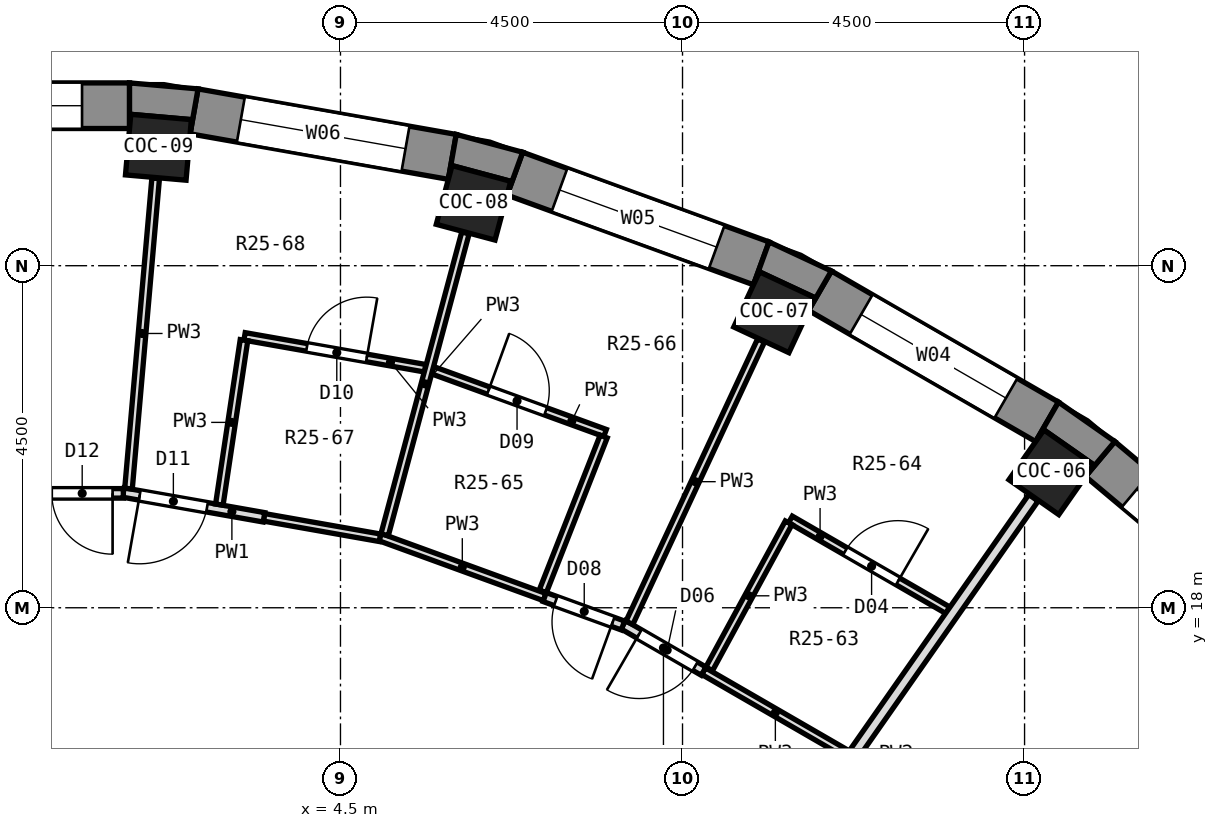
"""IFC4 building model, lengths in metres.
Left out: names, types, materials, properties, quantities, classifications, styles, units other than length and angle.
Written with IfcOpenShell. Run it as: python <this file> out.ifc"""

import sys

from ifc_helpers import new_model, si_unit, direction, frame, frame_2d, origin, origin_2d, place, context, subcontext, project, spatial, polyline, rectangle, outline, extrude, element, fill, save


model = new_model("IFC4")
c1 = context("Model", 3, precision=1e-05, world=origin(), true_north=direction((0.0, 1.0)))
c2 = subcontext(c1, "Body", "Model", "MODEL_VIEW")
j1 = project(units=[si_unit("LENGTHUNIT", "METRE"), si_unit("PLANEANGLEUNIT", "RADIAN")], contexts=[c1])
p1 = place(None, origin())
s1 = spatial("IfcSite", under=j1, at=p1, CompositionType="ELEMENT")
p2 = place(p1, origin())
s2 = spatial("IfcBuilding", under=s1, at=p2, CompositionType="ELEMENT")
p3 = place(p2, frame((0.0, 0.0, 160.8)))
s3 = spatial("IfcBuildingStorey", under=s2, at=p3, CompositionType="ELEMENT", Elevation=160.8)
for number, where, z_axis, x_axis in (
    (1, (13.852, 19.782, 0.0), (0.0, 0.0, 1.0), (0.574, 0.819, 0.0)),
    (2, (10.206, 21.887, 0.0), (0.0, 0.0, 1.0), (0.423, 0.906, 0.0)),
    (3, (6.25, 23.327, 0.0), (0.0, 0.0, 1.0), (0.259, 0.966, 0.0)),
    (4, (2.105, 24.058, 0.0), (0.0, 0.0, 1.0), (0.087, 0.996, 0.0)),
):
    element("IfcColumn", number, at=place(p3, frame(where, z_axis=z_axis, x_axis=x_axis)), inside=s3, PredefinedType="COLUMN", context=c2, shape_type="SweptSolid", body=[
        extrude(rectangle(XDim=0.8, YDim=0.8, at=origin_2d()), origin(), (0.0, 0.0, 1.0), 3.3),
    ])
p4 = place(p3, frame((17.137, 17.74, 0.0), z_axis=(0.0, 0.0, 1.0), x_axis=(-0.766058884809, 0.642770398358, 0.0)))
e5 = element("IfcWall", 5, at=p4, inside=s3, PredefinedType="SOLIDWALL", context=c2, shape_type="SweptSolid", body=[
    extrude(rectangle(XDim=3.449, YDim=0.6, at=frame_2d((1.725, 0.0))), origin(), (0.0, 0.0, 1.0), 2.85),
])
p5 = place(p4, frame((0.625, 0.0, 0.9)))
e6 = element("IfcOpeningElement", 6, at=p5, cuts=e5, PredefinedType="OPENING", context=c2, shape_type="SweptSolid", body=[
    extrude(rectangle(XDim=2.2, YDim=1.8, at=frame_2d((1.1, 0.9))), frame((0.0, 0.312, 0.0), z_axis=(0.0, -1.0, 0.0), x_axis=(1.0, 0.0, 0.0)), (0.0, 0.0, 1.0), 0.624),
])
p6 = place(p3, frame((13.796, 20.446, 0.0), z_axis=(0.0, 0.0, 1.0), x_axis=(-0.86602648383, 0.499998129301, 0.0)))
e7 = element("IfcWall", 7, at=p6, inside=s3, PredefinedType="SOLIDWALL", context=c2, shape_type="SweptSolid", body=[
    extrude(rectangle(XDim=3.45, YDim=0.6, at=frame_2d((1.725, 0.0))), origin(), (0.0, 0.0, 1.0), 2.85),
])
p7 = place(p6, frame((0.625, 0.0, 0.9)))
e8 = element("IfcOpeningElement", 8, at=p7, cuts=e7, PredefinedType="OPENING", context=c2, shape_type="SweptSolid", body=[
    extrude(rectangle(XDim=2.2, YDim=1.8, at=frame_2d((1.1, 0.9))), frame((0.0, 0.312, 0.0), z_axis=(0.0, -1.0, 0.0), x_axis=(1.0, 0.0, 0.0)), (0.0, 0.0, 1.0), 0.624),
])
p8 = place(p3, frame((10.036, 22.531, 0.0), z_axis=(0.0, 0.0, 1.0), x_axis=(-0.93968799822, 0.342032843455, 0.0)))
e9 = element("IfcWall", 9, at=p8, inside=s3, PredefinedType="SOLIDWALL", context=c2, shape_type="SweptSolid", body=[
    extrude(rectangle(XDim=3.45, YDim=0.6, at=frame_2d((1.725, 0.0))), origin(), (0.0, 0.0, 1.0), 2.85),
])
p9 = place(p8, frame((0.625, 0.0, 0.9)))
e10 = element("IfcOpeningElement", 10, at=p9, cuts=e9, PredefinedType="OPENING", context=c2, shape_type="SweptSolid", body=[
    extrude(rectangle(XDim=2.2, YDim=1.8, at=frame_2d((1.1, 0.9))), frame((0.0, 0.312, 0.0), z_axis=(0.0, -1.0, 0.0), x_axis=(1.0, 0.0, 0.0)), (0.0, 0.0, 1.0), 0.624),
])
p10 = place(p3, frame((5.971, 23.932, 0.0), z_axis=(0.0, 0.0, 1.0), x_axis=(-0.984814892183, 0.173607684551, 0.0)))
e11 = element("IfcWall", 11, at=p10, inside=s3, PredefinedType="SOLIDWALL", context=c2, shape_type="SweptSolid", body=[
    extrude(rectangle(XDim=3.45, YDim=0.6, at=frame_2d((1.725, 0.0))), origin(), (0.0, 0.0, 1.0), 2.85),
])
p11 = place(p10, frame((0.625, 0.0, 0.9)))
e12 = element("IfcOpeningElement", 12, at=p11, cuts=e11, PredefinedType="OPENING", context=c2, shape_type="SweptSolid", body=[
    extrude(rectangle(XDim=2.2, YDim=1.8, at=frame_2d((1.1, 0.9))), frame((0.0, 0.312, 0.0), z_axis=(0.0, -1.0, 0.0), x_axis=(1.0, 0.0, 0.0)), (0.0, 0.0, 1.0), 0.624),
])
p12 = place(p3, frame((1.725, 24.605, 0.0), z_axis=(0.0, 0.0, 1.0), x_axis=(-1.0, 0.0, 0.0)))
e13 = element("IfcWall", 13, at=p12, inside=s3, PredefinedType="SOLIDWALL", context=c2, shape_type="SweptSolid", body=[
    extrude(rectangle(XDim=3.45, YDim=0.6, at=frame_2d((1.725, 0.0))), origin(), (0.0, 0.0, 1.0), 2.85),
])
p13 = place(p12, frame((0.625, 0.0, 0.9)))
e14 = element("IfcOpeningElement", 14, at=p13, cuts=e13, PredefinedType="OPENING", context=c2, shape_type="SweptSolid", body=[
    extrude(rectangle(XDim=2.2, YDim=1.8, at=frame_2d((1.1, 0.9))), frame((0.0, 0.312, 0.0), z_axis=(0.0, -1.0, 0.0), x_axis=(1.0, 0.0, 0.0)), (0.0, 0.0, 1.0), 0.624),
])
p14 = place(p3, origin())
e15 = element("IfcWall", 15, at=p14, inside=s3, PredefinedType="SOLIDWALL", context=c2, shape_type="SweptSolid", body=[
    extrude(outline(polyline([(14.687, 20.187), (13.946, 20.706), (13.646, 20.186), (13.754, 20.34), (14.409, 19.881), (14.302, 19.727), (14.687, 20.187)])), origin(), (0.0, 0.0, 1.0), 2.85),
])
p15 = place(p3, origin())
e16 = element("IfcWall", 16, at=p15, inside=s3, PredefinedType="SOLIDWALL", context=c2, shape_type="SweptSolid", body=[
    extrude(outline(polyline([(10.139, 22.813), (9.934, 22.249), (10.013, 22.419), (10.738, 22.081), (10.659, 21.911), (10.959, 22.431), (10.139, 22.813)])), origin(), (0.0, 0.0, 1.0), 2.85),
])
p16 = place(p3, origin())
e17 = element("IfcWall", 17, at=p16, inside=s3, PredefinedType="SOLIDWALL", context=c2, shape_type="SweptSolid", body=[
    extrude(outline(polyline([(6.023, 24.227), (5.919, 23.636), (5.968, 23.817), (6.74, 23.61), (6.692, 23.429), (6.897, 23.993), (6.023, 24.227)])), origin(), (0.0, 0.0, 1.0), 2.85),
])
p17 = place(p3, origin())
e18 = element("IfcWall", 18, at=p17, inside=s3, PredefinedType="SOLIDWALL", context=c2, shape_type="SweptSolid", body=[
    extrude(outline(polyline([(2.626, 24.826), (1.725, 24.905), (1.725, 24.305), (1.741, 24.491), (2.538, 24.422), (2.522, 24.235), (2.626, 24.826)])), origin(), (0.0, 0.0, 1.0), 2.85),
])
p18 = place(p3, frame((9.278, 17.166, 0.0), z_axis=(0.0, 0.0, 1.0), x_axis=(0.865855370195, -0.500294391238, 0.0)))
e19 = element("IfcWall", 19, at=p18, inside=s3, PredefinedType="PARTITIONING", context=c2, shape_type="SweptSolid", body=[
    extrude(rectangle(XDim=2.18, YDim=0.1, at=frame_2d((1.09, 0.0))), origin(), (0.0, 0.0, 1.0), 2.85),
])
p19 = place(p3, frame((8.22, 17.777, 0.0), z_axis=(0.0, 0.0, 1.0), x_axis=(0.865945878506, -0.500137716533, 0.0)))
e20 = element("IfcWall", 20, at=p19, inside=s3, PredefinedType="PARTITIONING", context=c2, shape_type="SweptSolid", body=[
    extrude(rectangle(XDim=1.221, YDim=0.125, at=frame_2d((0.611, 0.0))), origin(), (0.0, 0.0, 1.0), 2.85),
])
p20 = place(p19, frame((0.242, 0.0, 0.0)))
e21 = element("IfcOpeningElement", 21, at=p20, cuts=e20, PredefinedType="OPENING", context=c2, shape_type="SweptSolid", body=[
    extrude(rectangle(XDim=0.85, YDim=2.1, at=frame_2d((0.425, 1.05))), frame((0.0, 0.074, 0.0), z_axis=(0.0, -1.0, 0.0), x_axis=(1.0, 0.0, 0.0)), (0.0, 0.0, 1.0), 0.149),
])
p21 = place(p3, frame((10.42, 19.162, 0.0), z_axis=(0.0, 0.0, 1.0), x_axis=(0.866129460467, -0.499819725211, 0.0)))
e22 = element("IfcWall", 22, at=p21, inside=s3, PredefinedType="PARTITIONING", context=c2, shape_type="SweptSolid", body=[
    extrude(rectangle(XDim=2.39, YDim=0.1, at=frame_2d((1.195, 0.0))), origin(), (0.0, 0.0, 1.0), 2.85),
])
p22 = place(p21, frame((0.833, 0.0, 0.0)))
e23 = element("IfcOpeningElement", 23, at=p22, cuts=e22, PredefinedType="OPENING", context=c2, shape_type="SweptSolid", body=[
    extrude(rectangle(XDim=0.8, YDim=2.1, at=frame_2d((0.4, 1.05))), frame((0.0, 0.062, 0.0), z_axis=(0.0, -1.0, 0.0), x_axis=(1.0, 0.0, 0.0)), (0.0, 0.0, 1.0), 0.124),
])
p23 = place(p3, frame((5.02, 18.929, 0.0), z_axis=(0.0, 0.0, 1.0), x_axis=(0.939651079277, -0.342134256123, 0.0)))
e24 = element("IfcWall", 24, at=p23, inside=s3, PredefinedType="PARTITIONING", context=c2, shape_type="SweptSolid", body=[
    extrude(rectangle(XDim=2.305, YDim=0.1, at=frame_2d((1.152, 0.0))), origin(), (0.0, 0.0, 1.0), 2.85),
])
p24 = place(p3, frame((7.186, 18.141, 0.0), z_axis=(0.0, 0.0, 1.0), x_axis=(0.939832432098, -0.341635770341, 0.0)))
e25 = element("IfcWall", 25, at=p24, inside=s3, PredefinedType="PARTITIONING", context=c2, shape_type="SweptSolid", body=[
    extrude(rectangle(XDim=1.096, YDim=0.125, at=frame_2d((0.548, 0.0))), origin(), (0.0, 0.0, 1.0), 2.85),
])
p25 = place(p24, frame((0.154, 0.0, 0.0)))
e26 = element("IfcOpeningElement", 26, at=p25, cuts=e25, PredefinedType="OPENING", context=c2, shape_type="SweptSolid", body=[
    extrude(rectangle(XDim=0.8, YDim=2.1, at=frame_2d((0.4, 1.05))), frame((0.0, 0.074, 0.0), z_axis=(0.0, -1.0, 0.0), x_axis=(1.0, 0.0, 0.0)), (0.0, 0.0, 1.0), 0.149),
])
p26 = place(p3, frame((5.712, 21.125, 0.0), z_axis=(0.0, 0.0, 1.0), x_axis=(0.939684150909, -0.342043413226, 0.0)))
e27 = element("IfcWall", 27, at=p26, inside=s3, PredefinedType="PARTITIONING", context=c2, shape_type="SweptSolid", body=[
    extrude(rectangle(XDim=2.415, YDim=0.1, at=frame_2d((1.208, 0.0))), origin(), (0.0, 0.0, 1.0), 2.85),
])
p27 = place(p26, frame((0.782, 0.0, 0.0)))
e28 = element("IfcOpeningElement", 28, at=p27, cuts=e27, PredefinedType="OPENING", context=c2, shape_type="SweptSolid", body=[
    extrude(rectangle(XDim=0.8, YDim=2.1, at=frame_2d((0.4, 1.05))), frame((0.0, 0.062, 0.0), z_axis=(0.0, -1.0, 0.0), x_axis=(1.0, 0.0, 0.0)), (0.0, 0.0, 1.0), 0.124),
])
p28 = place(p3, frame((3.494, 19.19, 0.0), z_axis=(0.0, 0.0, 1.0), x_axis=(0.984794665863, -0.173722382228, 0.0)))
e29 = element("IfcWall", 29, at=p28, inside=s3, PredefinedType="PARTITIONING", context=c2, shape_type="SweptSolid", body=[
    extrude(rectangle(XDim=1.549, YDim=0.1, at=frame_2d((0.774, 0.0))), origin(), (0.0, 0.0, 1.0), 2.85),
])
p29 = place(p3, frame((1.644, 19.516, 0.0), z_axis=(0.0, 0.0, 1.0), x_axis=(0.984794021773, -0.173726033396, 0.0)))
e30 = element("IfcWall", 30, at=p29, inside=s3, PredefinedType="PARTITIONING", context=c2, shape_type="SweptSolid", body=[
    extrude(rectangle(XDim=1.879, YDim=0.125, at=frame_2d((0.939, 0.0))), origin(), (0.0, 0.0, 1.0), 2.85),
])
p30 = place(p29, frame((0.218, 0.0, 0.0)))
e31 = element("IfcOpeningElement", 31, at=p30, cuts=e30, PredefinedType="OPENING", context=c2, shape_type="SweptSolid", body=[
    extrude(rectangle(XDim=0.9, YDim=2.1, at=frame_2d((0.45, 1.05))), frame((0.0, 0.074, 0.0), z_axis=(0.0, -1.0, 0.0), x_axis=(1.0, 0.0, 0.0)), (0.0, 0.0, 1.0), 0.149),
])
p31 = place(p3, frame((3.238, 21.57, 0.0), z_axis=(0.0, 0.0, 1.0), x_axis=(0.984794754479, -0.173721879884, 0.0)))
e32 = element("IfcWall", 32, at=p31, inside=s3, PredefinedType="PARTITIONING", context=c2, shape_type="SweptSolid", body=[
    extrude(rectangle(XDim=2.414, YDim=0.1, at=frame_2d((1.207, 0.0))), origin(), (0.0, 0.0, 1.0), 2.85),
])
p32 = place(p31, frame((0.832, 0.0, 0.0)))
e33 = element("IfcOpeningElement", 33, at=p32, cuts=e32, PredefinedType="OPENING", context=c2, shape_type="SweptSolid", body=[
    extrude(rectangle(XDim=0.8, YDim=2.1, at=frame_2d((0.4, 1.05))), frame((0.0, 0.062, 0.0), z_axis=(0.0, -1.0, 0.0), x_axis=(1.0, 0.0, 0.0)), (0.0, 0.0, 1.0), 0.124),
])
p33 = place(p3, frame((0.548, 19.505, 0.0), z_axis=(0.0, 0.0, 1.0), x_axis=(1.0, 0.0, 0.0)))
e34 = element("IfcWall", 34, at=p33, inside=s3, PredefinedType="PARTITIONING", context=c2, shape_type="SweptSolid", body=[
    extrude(rectangle(XDim=1.095, YDim=0.125, at=frame_2d((0.548, 0.0))), origin(), (0.0, 0.0, 1.0), 2.85),
])
p34 = place(p33, frame((0.154, 0.0, 0.0)))
e35 = element("IfcOpeningElement", 35, at=p34, cuts=e34, PredefinedType="OPENING", context=c2, shape_type="SweptSolid", body=[
    extrude(rectangle(XDim=0.8, YDim=2.1, at=frame_2d((0.4, 1.05))), frame((0.0, 0.074, 0.0), z_axis=(0.0, -1.0, 0.0), x_axis=(1.0, 0.0, 0.0)), (0.0, 0.0, 1.0), 0.149),
])
p35 = place(p3, frame((8.903, 12.715, 0.0), z_axis=(0.0, 0.0, 1.0), x_axis=(0.573585951544, 0.819145381597, 0.0)))
e36 = element("IfcWall", 36, at=p35, inside=s3, PredefinedType="PARTITIONING", context=c2, shape_type="SweptSolid", body=[
    extrude(rectangle(XDim=8.218, YDim=0.15, at=frame_2d((4.109, 0.0))), origin(), (0.0, 0.0, 1.0), 2.85),
])
p36 = place(p3, frame((9.351, 17.196, 0.0), z_axis=(0.0, 0.0, 1.0), x_axis=(0.477616319427, 0.87856852403, 0.0)))
e37 = element("IfcWall", 37, at=p36, inside=s3, PredefinedType="PARTITIONING", context=c2, shape_type="SweptSolid", body=[
    extrude(rectangle(XDim=2.188, YDim=0.1, at=frame_2d((1.094, 0.0))), origin(), (0.0, 0.0, 1.0), 2.85),
])
p37 = place(p3, frame((8.302, 17.802, 0.0), z_axis=(0.0, 0.0, 1.0), x_axis=(0.422546217204, 0.90634137847, 0.0)))
e38 = element("IfcWall", 38, at=p37, inside=s3, PredefinedType="PARTITIONING", context=c2, shape_type="SweptSolid", body=[
    extrude(rectangle(XDim=4.098, YDim=0.1, at=frame_2d((2.049, 0.0))), origin(), (0.0, 0.0, 1.0), 2.85),
])
p38 = place(p3, frame((7.162, 18.216, 0.0), z_axis=(0.0, 0.0, 1.0), x_axis=(0.365959579046, 0.930630746593, 0.0)))
e39 = element("IfcWall", 39, at=p38, inside=s3, PredefinedType="PARTITIONING", context=c2, shape_type="SweptSolid", body=[
    extrude(rectangle(XDim=2.188, YDim=0.1, at=frame_2d((1.094, 0.0))), origin(), (0.0, 0.0, 1.0), 2.85),
])
p39 = place(p3, frame((5.081, 18.96, 0.0), z_axis=(0.0, 0.0, 1.0), x_axis=(0.258642078309, 0.965973227025, 0.0)))
e40 = element("IfcWall", 40, at=p39, inside=s3, PredefinedType="PARTITIONING", context=c2, shape_type="SweptSolid", body=[
    extrude(rectangle(XDim=4.111, YDim=0.1, at=frame_2d((2.055, 0.0))), origin(), (0.0, 0.0, 1.0), 2.85),
])
p40 = place(p3, frame((2.906, 19.357, 0.0), z_axis=(0.0, 0.0, 1.0), x_axis=(0.148182215979, 0.988960075467, 0.0)))
e41 = element("IfcWall", 41, at=p40, inside=s3, PredefinedType="PARTITIONING", context=c2, shape_type="SweptSolid", body=[
    extrude(rectangle(XDim=2.188, YDim=0.1, at=frame_2d((1.094, 0.0))), origin(), (0.0, 0.0, 1.0), 2.85),
])
p41 = place(p3, frame((1.711, 19.567, 0.0), z_axis=(0.0, 0.0, 1.0), x_axis=(0.087161776864, 0.996194170157, 0.0)))
e42 = element("IfcWall", 42, at=p41, inside=s3, PredefinedType="PARTITIONING", context=c2, shape_type="SweptSolid", body=[
    extrude(rectangle(XDim=4.098, YDim=0.1, at=frame_2d((2.049, 0.0))), origin(), (0.0, 0.0, 1.0), 2.85),
])
p42 = place(p5, origin())
e43 = element("IfcWindow", 43, at=p42, inside=s3, PartitioningType="SINGLE_PANEL", PredefinedType="WINDOW", context=c2, shape_type="SweptSolid", body=[
    extrude(rectangle(XDim=2.2, YDim=1.8, at=frame_2d((1.1, 0.9))), frame((0.0, 0.18, 0.0), z_axis=(0.0, -1.0, 0.0), x_axis=(1.0, 0.0, 0.0)), (0.0, 0.0, 1.0), 0.06),
])
fill(e6, e43)
p43 = place(p7, origin())
e44 = element("IfcWindow", 44, at=p43, inside=s3, PartitioningType="SINGLE_PANEL", PredefinedType="WINDOW", context=c2, shape_type="SweptSolid", body=[
    extrude(rectangle(XDim=2.2, YDim=1.8, at=frame_2d((1.1, 0.9))), frame((0.0, 0.18, 0.0), z_axis=(0.0, -1.0, 0.0), x_axis=(1.0, 0.0, 0.0)), (0.0, 0.0, 1.0), 0.06),
])
fill(e8, e44)
p44 = place(p9, origin())
e45 = element("IfcWindow", 45, at=p44, inside=s3, PartitioningType="SINGLE_PANEL", PredefinedType="WINDOW", context=c2, shape_type="SweptSolid", body=[
    extrude(rectangle(XDim=2.2, YDim=1.8, at=frame_2d((1.1, 0.9))), frame((0.0, 0.18, 0.0), z_axis=(0.0, -1.0, 0.0), x_axis=(1.0, 0.0, 0.0)), (0.0, 0.0, 1.0), 0.06),
])
fill(e10, e45)
p45 = place(p11, origin())
e46 = element("IfcWindow", 46, at=p45, inside=s3, PartitioningType="SINGLE_PANEL", PredefinedType="WINDOW", context=c2, shape_type="SweptSolid", body=[
    extrude(rectangle(XDim=2.2, YDim=1.8, at=frame_2d((1.1, 0.9))), frame((0.0, 0.18, 0.0), z_axis=(0.0, -1.0, 0.0), x_axis=(1.0, 0.0, 0.0)), (0.0, 0.0, 1.0), 0.06),
])
fill(e12, e46)
p46 = place(p13, origin())
e47 = element("IfcWindow", 47, at=p46, inside=s3, PartitioningType="SINGLE_PANEL", PredefinedType="WINDOW", context=c2, shape_type="SweptSolid", body=[
    extrude(rectangle(XDim=2.2, YDim=1.8, at=frame_2d((1.1, 0.9))), frame((0.0, 0.18, 0.0), z_axis=(0.0, -1.0, 0.0), x_axis=(1.0, 0.0, 0.0)), (0.0, 0.0, 1.0), 0.06),
])
fill(e14, e47)
p47 = place(p22, origin())
e48 = element("IfcDoor", 48, at=p47, inside=s3, OperationType="SINGLE_SWING_RIGHT", PredefinedType="DOOR", context=c2, shape_type="SweptSolid", body=[
    extrude(rectangle(XDim=0.8, YDim=2.1, at=frame_2d((0.4, 1.05))), frame((0.0, 0.025, 0.0), z_axis=(0.0, -1.0, 0.0), x_axis=(1.0, 0.0, 0.0)), (0.0, 0.0, 1.0), 0.05),
])
fill(e23, e48)
p48 = place(p20, frame((0.85, 0.0, 0.0), z_axis=(0.0, 0.0, 1.0), x_axis=(-1.0, 0.0, 0.0)))
e49 = element("IfcDoor", 49, at=p48, inside=s3, OperationType="SINGLE_SWING_RIGHT", PredefinedType="DOOR", context=c2, shape_type="SweptSolid", body=[
    extrude(rectangle(XDim=0.85, YDim=2.1, at=frame_2d((0.425, 1.05))), frame((0.0, 0.025, 0.0), z_axis=(0.0, -1.0, 0.0), x_axis=(1.0, 0.0, 0.0)), (0.0, 0.0, 1.0), 0.05),
])
fill(e21, e49)
p49 = place(p25, frame((0.8, 0.0, 0.0), z_axis=(0.0, 0.0, 1.0), x_axis=(-1.0, 0.0, 0.0)))
e50 = element("IfcDoor", 50, at=p49, inside=s3, OperationType="SINGLE_SWING_LEFT", PredefinedType="DOOR", context=c2, shape_type="SweptSolid", body=[
    extrude(rectangle(XDim=0.8, YDim=2.1, at=frame_2d((0.4, 1.05))), frame((0.0, 0.025, 0.0), z_axis=(0.0, -1.0, 0.0), x_axis=(1.0, 0.0, 0.0)), (0.0, 0.0, 1.0), 0.05),
])
fill(e26, e50)
p50 = place(p27, origin())
e51 = element("IfcDoor", 51, at=p50, inside=s3, OperationType="SINGLE_SWING_LEFT", PredefinedType="DOOR", context=c2, shape_type="SweptSolid", body=[
    extrude(rectangle(XDim=0.8, YDim=2.1, at=frame_2d((0.4, 1.05))), frame((0.0, 0.025, 0.0), z_axis=(0.0, -1.0, 0.0), x_axis=(1.0, 0.0, 0.0)), (0.0, 0.0, 1.0), 0.05),
])
fill(e28, e51)
p51 = place(p32, origin())
e52 = element("IfcDoor", 52, at=p51, inside=s3, OperationType="SINGLE_SWING_RIGHT", PredefinedType="DOOR", context=c2, shape_type="SweptSolid", body=[
    extrude(rectangle(XDim=0.8, YDim=2.1, at=frame_2d((0.4, 1.05))), frame((0.0, 0.025, 0.0), z_axis=(0.0, -1.0, 0.0), x_axis=(1.0, 0.0, 0.0)), (0.0, 0.0, 1.0), 0.05),
])
fill(e33, e52)
p52 = place(p30, frame((0.9, 0.0, 0.0), z_axis=(0.0, 0.0, 1.0), x_axis=(-1.0, 0.0, 0.0)))
e53 = element("IfcDoor", 53, at=p52, inside=s3, OperationType="SINGLE_SWING_RIGHT", PredefinedType="DOOR", context=c2, shape_type="SweptSolid", body=[
    extrude(rectangle(XDim=0.9, YDim=2.1, at=frame_2d((0.45, 1.05))), frame((0.0, 0.025, 0.0), z_axis=(0.0, -1.0, 0.0), x_axis=(1.0, 0.0, 0.0)), (0.0, 0.0, 1.0), 0.05),
])
fill(e31, e53)
p53 = place(p34, frame((0.8, 0.0, 0.0), z_axis=(0.0, 0.0, 1.0), x_axis=(-1.0, 0.0, 0.0)))
e54 = element("IfcDoor", 54, at=p53, inside=s3, OperationType="SINGLE_SWING_LEFT", PredefinedType="DOOR", context=c2, shape_type="SweptSolid", body=[
    extrude(rectangle(XDim=0.8, YDim=2.1, at=frame_2d((0.4, 1.05))), frame((0.0, 0.025, 0.0), z_axis=(0.0, -1.0, 0.0), x_axis=(1.0, 0.0, 0.0)), (0.0, 0.0, 1.0), 0.05),
])
fill(e35, e54)
save(model, sys.argv[1])
